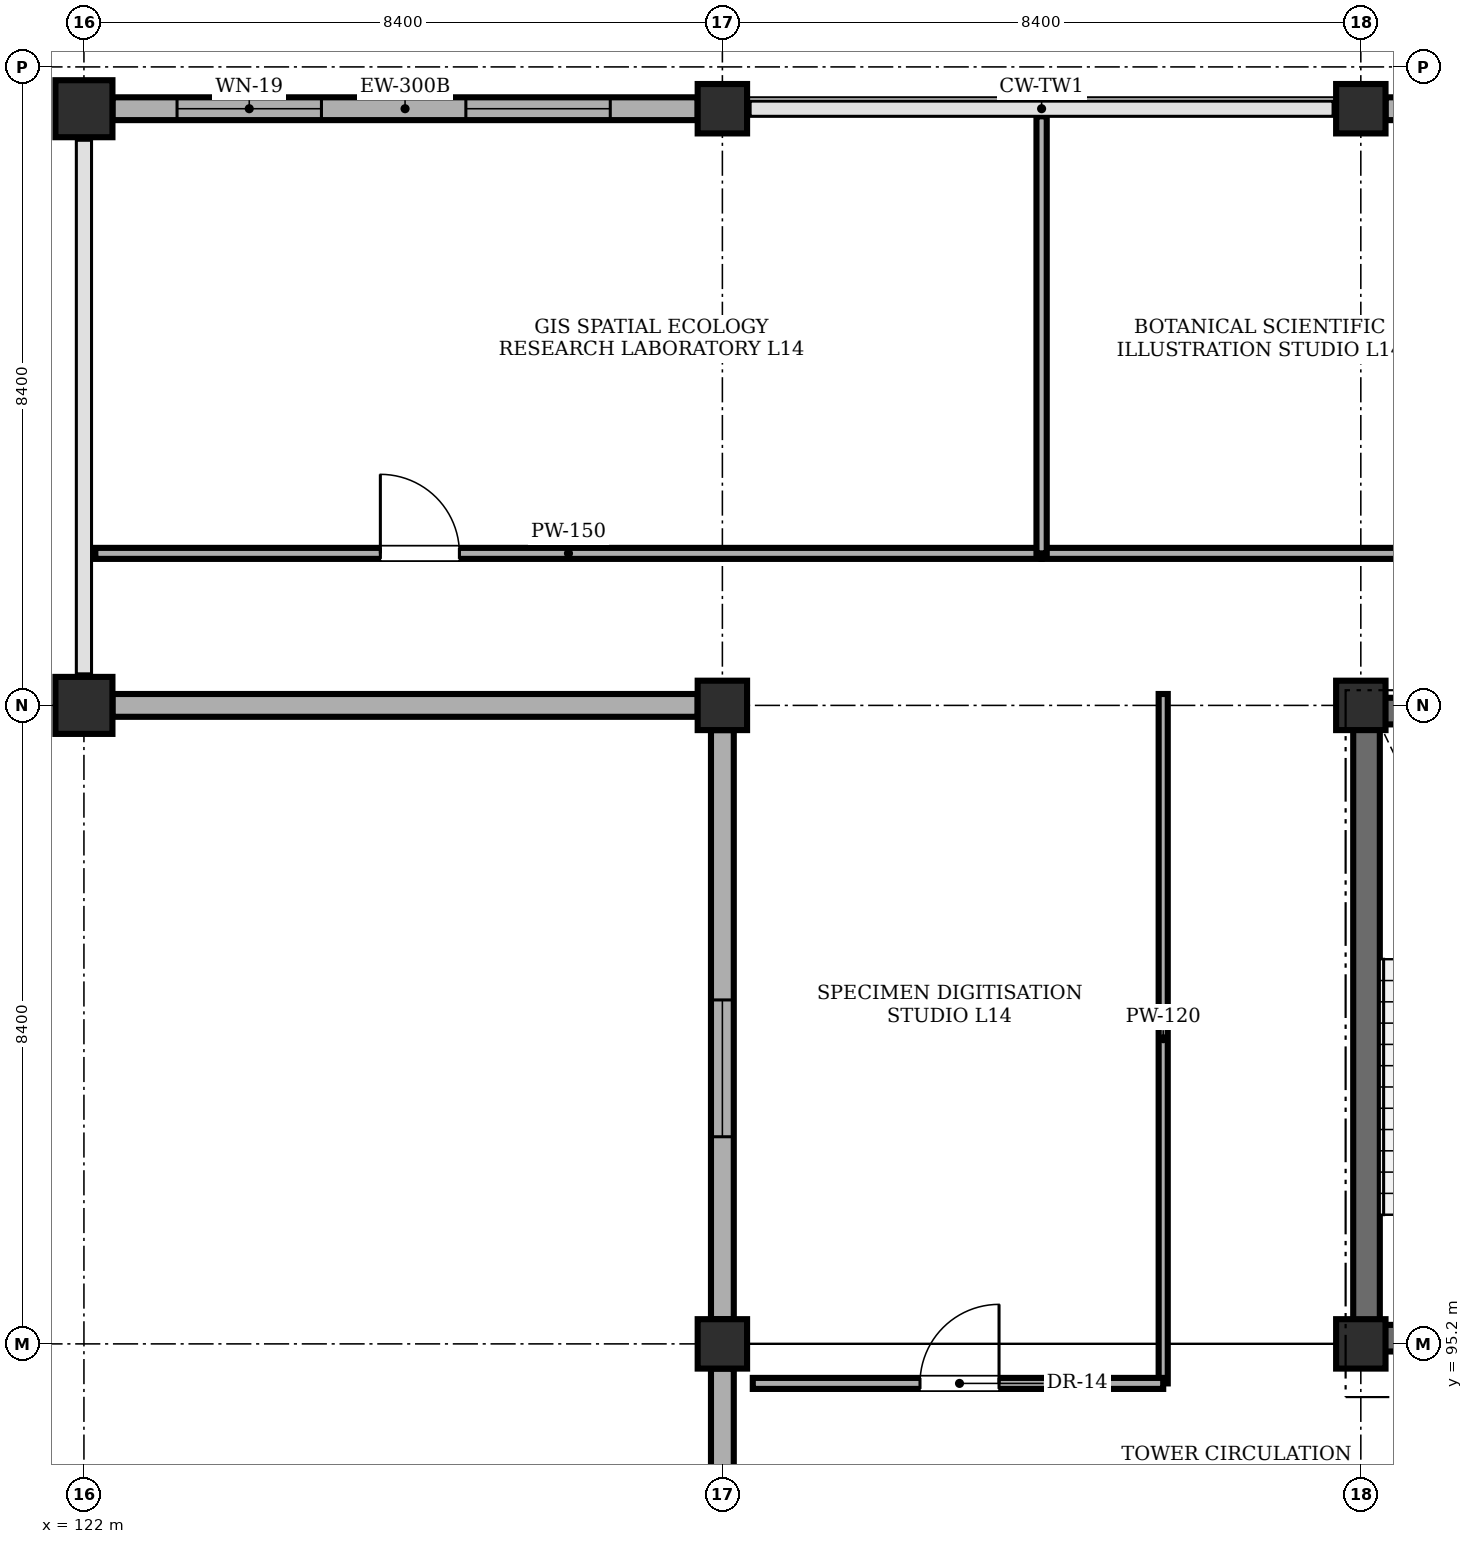
"""IFC4 building model, lengths in metres.
Left out: names, types, materials, properties, quantities, classifications, styles, units other than length and angle.
Written with IfcOpenShell. Run it as: python <this file> out.ifc"""

import sys

from ifc_helpers import new_model, si_unit, direction, frame, frame_2d, origin, origin_2d, place, context, subcontext, project, spatial, rectangle, extrude, element, fill, save


model = new_model("IFC4")
c1 = context("Model", 3, precision=1e-05, world=origin(), true_north=direction((0.0, 1.0)))
c2 = subcontext(c1, "Body", "Model", "MODEL_VIEW")
j1 = project(units=[si_unit("LENGTHUNIT", "METRE"), si_unit("PLANEANGLEUNIT", "RADIAN")], contexts=[c1])
p1 = place(None, origin())
s1 = spatial("IfcSite", under=j1, at=p1, CompositionType="ELEMENT")
p2 = place(p1, origin())
s2 = spatial("IfcBuilding", under=s1, at=p2, CompositionType="ELEMENT")
p3 = place(p2, frame((0.0, 0.0, 57.0)))
s3 = spatial("IfcBuildingStorey", under=s2, at=p3, CompositionType="ELEMENT", Elevation=57.0)
for number, where, z_axis, x_axis in (
    (1, (122.0, 103.6, 0.0), (0.0, 0.0, 1.0), (1.0, 0.0, 0.0)),
    (2, (122.0, 111.45, 0.0), (0.0, 0.0, 1.0), (1.0, 0.0, 0.0)),
):
    element("IfcColumn", number, at=place(p3, frame(where, z_axis=z_axis, x_axis=x_axis)), inside=s3, PredefinedType="COLUMN", context=c2, shape_type="SweptSolid", body=[
        extrude(rectangle(XDim=0.75, YDim=0.75, at=origin_2d()), origin(), (0.0, 0.0, 1.0), 4.02),
    ])
for number, where, z_axis, x_axis in (
    (3, (130.4, 95.2, 0.0), (0.0, 0.0, 1.0), (1.0, 0.0, 0.0)),
    (4, (130.4, 103.6, 0.0), (0.0, 0.0, 1.0), (1.0, 0.0, 0.0)),
    (5, (130.4, 111.45, 0.0), (0.0, 0.0, 1.0), (1.0, 0.0, 0.0)),
    (6, (138.8, 95.2, 0.0), (0.0, 0.0, 1.0), (1.0, 0.0, 0.0)),
    (7, (138.8, 103.6, 0.0), (0.0, 0.0, 1.0), (1.0, 0.0, 0.0)),
    (8, (138.8, 111.45, 0.0), (0.0, 0.0, 1.0), (1.0, 0.0, 0.0)),
):
    element("IfcColumn", number, at=place(p3, frame(where, z_axis=z_axis, x_axis=x_axis)), inside=s3, PredefinedType="COLUMN", context=c2, shape_type="SweptSolid", body=[
        extrude(rectangle(XDim=0.65, YDim=0.65, at=origin_2d()), origin(), (0.0, 0.0, 1.0), 4.02),
    ])
for number, where, z_axis, x_axis in (
    (9, (138.7, 95.275, 0.0), (0.0, 0.0, 1.0), (1.0, 0.0, 0.0)),
    (10, (138.7, 103.525, 0.0), (0.0, 0.0, 1.0), (1.0, 0.0, 0.0)),
):
    element("IfcWall", number, at=place(p3, frame(where, z_axis=z_axis, x_axis=x_axis)), inside=s3, PredefinedType="SHEAR", context=c2, shape_type="SweptSolid", body=[
        extrude(rectangle(XDim=3.8, YDim=0.35, at=frame_2d((1.9, 0.0))), origin(), (0.0, 0.0, 1.0), 4.02),
    ])
p4 = place(p3, frame((138.875, 95.45, 0.0), z_axis=(0.0, 0.0, 1.0), x_axis=(0.0, 1.0, 0.0)))
e11 = element("IfcWall", 11, at=p4, inside=s3, PredefinedType="SHEAR", context=c2, shape_type="SweptSolid", body=[
    extrude(rectangle(XDim=7.9, YDim=0.35, at=frame_2d((3.95, 0.0))), origin(), (0.0, 0.0, 1.0), 4.02),
])
p5 = place(p3, frame((122.375, 111.45, 0.0), z_axis=(0.0, 0.0, 1.0), x_axis=(1.0, 0.0, 0.0)))
e12 = element("IfcWall", 12, at=p5, inside=s3, PredefinedType="STANDARD", context=c2, shape_type="SweptSolid", body=[
    extrude(rectangle(XDim=7.7, YDim=0.3, at=frame_2d((3.85, 0.0))), origin(), (0.0, 0.0, 1.0), 3.32),
])
p6 = place(p5, frame((0.85, 0.0, 0.9)))
e13 = element("IfcOpeningElement", 13, at=p6, cuts=e12, PredefinedType="OPENING", context=c2, shape_type="SweptSolid", body=[
    extrude(rectangle(XDim=1.9, YDim=2.1, at=frame_2d((0.95, 1.05))), frame((0.0, 0.16, 0.0), z_axis=(0.0, -1.0, 0.0), x_axis=(1.0, 0.0, 0.0)), (0.0, 0.0, 1.0), 0.32),
])
p7 = place(p5, frame((4.65, 0.0, 0.9)))
e14 = element("IfcOpeningElement", 14, at=p7, cuts=e12, PredefinedType="OPENING", context=c2, shape_type="SweptSolid", body=[
    extrude(rectangle(XDim=1.9, YDim=2.1, at=frame_2d((0.95, 1.05))), frame((0.0, 0.16, 0.0), z_axis=(0.0, -1.0, 0.0), x_axis=(1.0, 0.0, 0.0)), (0.0, 0.0, 1.0), 0.32),
])
p8 = place(p3, frame((139.125, 111.45, 0.0), z_axis=(0.0, 0.0, 1.0), x_axis=(1.0, 0.0, 0.0)))
e15 = element("IfcWall", 15, at=p8, inside=s3, PredefinedType="STANDARD", context=c2, shape_type="SweptSolid", body=[
    extrude(rectangle(XDim=7.75, YDim=0.3, at=frame_2d((3.875, 0.0))), origin(), (0.0, 0.0, 1.0), 3.32),
])
p9 = place(p8, frame((0.85, 0.0, 0.9)))
e16 = element("IfcOpeningElement", 16, at=p9, cuts=e15, PredefinedType="OPENING", context=c2, shape_type="SweptSolid", body=[
    extrude(rectangle(XDim=1.9, YDim=2.1, at=frame_2d((0.95, 1.05))), frame((0.0, 0.16, 0.0), z_axis=(0.0, -1.0, 0.0), x_axis=(1.0, 0.0, 0.0)), (0.0, 0.0, 1.0), 0.32),
])
p10 = place(p8, frame((4.65, 0.0, 0.9)))
e17 = element("IfcOpeningElement", 17, at=p10, cuts=e15, PredefinedType="OPENING", context=c2, shape_type="SweptSolid", body=[
    extrude(rectangle(XDim=1.9, YDim=2.1, at=frame_2d((0.95, 1.05))), frame((0.0, 0.16, 0.0), z_axis=(0.0, -1.0, 0.0), x_axis=(1.0, 0.0, 0.0)), (0.0, 0.0, 1.0), 0.32),
])
p11 = place(p3, frame((130.4, 92.15, 0.0), z_axis=(0.0, 0.0, 1.0), x_axis=(0.0, 1.0, 0.0)))
e18 = element("IfcWall", 18, at=p11, inside=s3, PredefinedType="STANDARD", context=c2, shape_type="SweptSolid", body=[
    extrude(rectangle(XDim=2.725, YDim=0.3, at=frame_2d((1.363, 0.0))), origin(), (0.0, 0.0, 1.0), 4.02),
])
p12 = place(p3, frame((130.4, 95.525, 0.0), z_axis=(0.0, 0.0, 1.0), x_axis=(0.0, 1.0, 0.0)))
e19 = element("IfcWall", 19, at=p12, inside=s3, PredefinedType="STANDARD", context=c2, shape_type="SweptSolid", body=[
    extrude(rectangle(XDim=7.75, YDim=0.3, at=frame_2d((3.875, 0.0))), origin(), (0.0, 0.0, 1.0), 3.32),
])
p13 = place(p12, frame((2.4, 0.0, 1.0)))
e20 = element("IfcOpeningElement", 20, at=p13, cuts=e19, PredefinedType="OPENING", context=c2, shape_type="SweptSolid", body=[
    extrude(rectangle(XDim=1.8, YDim=1.8, at=frame_2d((0.9, 0.9))), frame((0.0, 0.16, 0.0), z_axis=(0.0, -1.0, 0.0), x_axis=(1.0, 0.0, 0.0)), (0.0, 0.0, 1.0), 0.32),
])
p14 = place(p3, frame((130.075, 103.6, 0.0), z_axis=(0.0, 0.0, 1.0), x_axis=(-1.0, 0.0, 0.0)))
e21 = element("IfcWall", 21, at=p14, inside=s3, PredefinedType="STANDARD", context=c2, shape_type="SweptSolid", body=[
    extrude(rectangle(XDim=7.7, YDim=0.3, at=frame_2d((3.85, 0.0))), origin(), (0.0, 0.0, 1.0), 3.32),
])
p15 = place(p3, frame((136.2, 94.68, 0.0), z_axis=(0.0, 0.0, 1.0), x_axis=(0.0, 1.0, 0.0)))
e22 = element("IfcWall", 22, at=p15, inside=s3, PredefinedType="PARTITIONING", context=c2, shape_type="SweptSolid", body=[
    extrude(rectangle(XDim=9.07, YDim=0.12, at=frame_2d((4.535, 0.0))), origin(), (0.0, 0.0, 1.0), 4.02),
])
p16 = place(p3, frame((130.8, 94.68, 0.0), z_axis=(0.0, 0.0, 1.0), x_axis=(1.0, 0.0, 0.0)))
e23 = element("IfcWall", 23, at=p16, inside=s3, PredefinedType="PARTITIONING", context=c2, shape_type="SweptSolid", body=[
    extrude(rectangle(XDim=5.4, YDim=0.145, at=frame_2d((2.7, 0.0))), origin(), (0.0, 0.0, 1.0), 4.02),
])
p17 = place(p16, frame((2.2, 0.0, 0.0)))
e24 = element("IfcOpeningElement", 24, at=p17, cuts=e23, PredefinedType="OPENING", context=c2, shape_type="SweptSolid", body=[
    extrude(rectangle(XDim=1.04, YDim=2.16, at=frame_2d((0.52, 1.08))), frame((0.0, 0.083, 0.0), z_axis=(0.0, -1.0, 0.0), x_axis=(1.0, 0.0, 0.0)), (0.0, 0.0, 1.0), 0.165),
])
p18 = place(p3, frame((122.15, 105.6, 0.0), z_axis=(0.0, 0.0, 1.0), x_axis=(1.0, 0.0, 0.0)))
e25 = element("IfcWall", 25, at=p18, inside=s3, PredefinedType="PARTITIONING", context=c2, shape_type="SweptSolid", body=[
    extrude(rectangle(XDim=12.45, YDim=0.145, at=frame_2d((6.225, 0.0))), origin(), (0.0, 0.0, 1.0), 4.02),
])
p19 = place(p18, frame((3.75, 0.0, 0.0)))
e26 = element("IfcOpeningElement", 26, at=p19, cuts=e25, PredefinedType="OPENING", context=c2, shape_type="SweptSolid", body=[
    extrude(rectangle(XDim=1.04, YDim=2.16, at=frame_2d((0.52, 1.08))), frame((0.0, 0.083, 0.0), z_axis=(0.0, -1.0, 0.0), x_axis=(1.0, 0.0, 0.0)), (0.0, 0.0, 1.0), 0.165),
])
p20 = place(p3, frame((134.6, 105.6, 0.0), z_axis=(0.0, 0.0, 1.0), x_axis=(1.0, 0.0, 0.0)))
e27 = element("IfcWall", 27, at=p20, inside=s3, PredefinedType="PARTITIONING", context=c2, shape_type="SweptSolid", body=[
    extrude(rectangle(XDim=12.6, YDim=0.145, at=frame_2d((6.3, 0.0))), origin(), (0.0, 0.0, 1.0), 4.02),
])
p21 = place(p20, frame((6.8, 0.0, 0.0)))
e28 = element("IfcOpeningElement", 28, at=p21, cuts=e27, PredefinedType="OPENING", context=c2, shape_type="SweptSolid", body=[
    extrude(rectangle(XDim=1.16, YDim=2.2, at=frame_2d((0.58, 1.1))), frame((0.0, 0.083, 0.0), z_axis=(0.0, -1.0, 0.0), x_axis=(1.0, 0.0, 0.0)), (0.0, 0.0, 1.0), 0.165),
])
p22 = place(p3, frame((134.6, 105.6, 0.0), z_axis=(0.0, 0.0, 1.0), x_axis=(0.0, 1.0, 0.0)))
e29 = element("IfcWall", 29, at=p22, inside=s3, PredefinedType="PARTITIONING", context=c2, shape_type="SweptSolid", body=[
    extrude(rectangle(XDim=5.75, YDim=0.135, at=frame_2d((2.875, 0.0))), origin(), (0.0, 0.0, 1.0), 3.57),
])
p23 = place(p6, origin())
e30 = element("IfcWindow", 30, at=p23, inside=s3, PartitioningType="DOUBLE_PANEL_VERTICAL", PredefinedType="WINDOW", context=c2, shape_type="SweptSolid", body=[
    extrude(rectangle(XDim=1.9, YDim=2.1, at=frame_2d((0.95, 1.05))), frame((0.0, 0.03, 0.0), z_axis=(0.0, -1.0, 0.0), x_axis=(1.0, 0.0, 0.0)), (0.0, 0.0, 1.0), 0.06),
])
fill(e13, e30)
p24 = place(p7, origin())
e31 = element("IfcWindow", 31, at=p24, inside=s3, PartitioningType="DOUBLE_PANEL_VERTICAL", PredefinedType="WINDOW", context=c2, shape_type="SweptSolid", body=[
    extrude(rectangle(XDim=1.9, YDim=2.1, at=frame_2d((0.95, 1.05))), frame((0.0, 0.03, 0.0), z_axis=(0.0, -1.0, 0.0), x_axis=(1.0, 0.0, 0.0)), (0.0, 0.0, 1.0), 0.06),
])
fill(e14, e31)
p25 = place(p13, origin())
e32 = element("IfcWindow", 32, at=p25, inside=s3, PartitioningType="DOUBLE_PANEL_VERTICAL", PredefinedType="WINDOW", context=c2, shape_type="SweptSolid", body=[
    extrude(rectangle(XDim=1.8, YDim=1.8, at=frame_2d((0.9, 0.9))), frame((0.0, 0.03, 0.0), z_axis=(0.0, -1.0, 0.0), x_axis=(1.0, 0.0, 0.0)), (0.0, 0.0, 1.0), 0.06),
])
fill(e20, e32)
p26 = place(p17, origin())
e33 = element("IfcDoor", 33, at=p26, inside=s3, OperationType="SINGLE_SWING_RIGHT", PredefinedType="DOOR", context=c2, shape_type="SweptSolid", body=[
    extrude(rectangle(XDim=1.04, YDim=2.16, at=frame_2d((0.52, 1.08))), frame((0.0, 0.025, 0.0), z_axis=(0.0, -1.0, 0.0), x_axis=(1.0, 0.0, 0.0)), (0.0, 0.0, 1.0), 0.05),
])
fill(e24, e33)
p27 = place(p19, origin())
e34 = element("IfcDoor", 34, at=p27, inside=s3, OperationType="SINGLE_SWING_LEFT", PredefinedType="DOOR", context=c2, shape_type="SweptSolid", body=[
    extrude(rectangle(XDim=1.04, YDim=2.16, at=frame_2d((0.52, 1.08))), frame((0.0, 0.025, 0.0), z_axis=(0.0, -1.0, 0.0), x_axis=(1.0, 0.0, 0.0)), (0.0, 0.0, 1.0), 0.05),
])
fill(e26, e34)
save(model, sys.argv[1])
